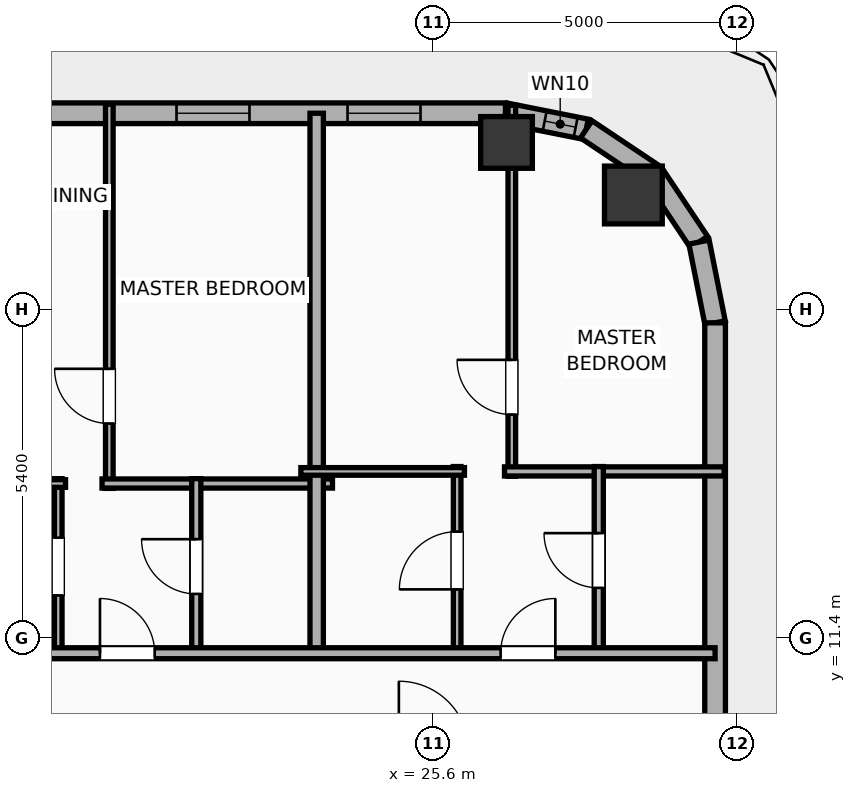
"""IFC4 building model, lengths in metres.
Left out: names, types, materials, properties, quantities, classifications, styles, units other than length and angle.
Written with IfcOpenShell. Run it as: python <this file> out.ifc"""

import sys

from ifc_helpers import new_model, si_unit, direction, frame, frame_2d, origin, origin_2d, place, context, subcontext, project, spatial, rectangle, hollow_rectangle, hollow_circle, extrude, element, fill, save


model = new_model("IFC4")
c1 = context("Model", 3, precision=1e-05, world=origin(), true_north=direction((0.0, 1.0)))
c2 = subcontext(c1, "Body", "Model", "MODEL_VIEW")
j1 = project(units=[si_unit("LENGTHUNIT", "METRE"), si_unit("PLANEANGLEUNIT", "RADIAN")], contexts=[c1])
p1 = place(None, origin())
s1 = spatial("IfcSite", under=j1, at=p1, CompositionType="ELEMENT")
p2 = place(p1, origin())
s2 = spatial("IfcBuilding", under=s1, at=p2, CompositionType="ELEMENT")
p3 = place(p2, frame((0.0, 0.0, 231.4)))
s3 = spatial("IfcBuildingStorey", under=s2, at=p3, CompositionType="ELEMENT", Elevation=231.4)
p4 = place(p3, frame((28.886, 18.686, 0.0), z_axis=(0.0, 0.0, 1.0), x_axis=(1.0, 0.0, 0.0)))
e1 = element("IfcColumn", 1, at=p4, inside=s3, PredefinedType="COLUMN", context=c2, shape_type="SweptSolid", body=[
    extrude(hollow_circle(Radius=0.475, WallThickness=0.032, at=origin_2d()), origin(), (0.0, 0.0, 1.0), 3.9),
])
p5 = place(p3, frame((26.8, 19.55, 0.0), z_axis=(0.0, 0.0, 1.0), x_axis=(1.0, 0.0, 0.0)))
e2 = element("IfcColumn", 2, at=p5, inside=s3, PredefinedType="COLUMN", context=c2, shape_type="SweptSolid", body=[
    extrude(hollow_rectangle(XDim=0.85, YDim=0.85, WallThickness=0.028, at=origin_2d()), origin(), (0.0, 0.0, 1.0), 3.9),
])
p6 = place(p3, frame((-22.783, 20.03, 0.0), z_axis=(0.0, 0.0, 1.0), x_axis=(1.0, 0.0, 0.0)))
e3 = element("IfcWall", 3, at=p6, inside=s3, PredefinedType="ELEMENTEDWALL", context=c2, shape_type="SweptSolid", body=[
    extrude(rectangle(XDim=49.566, YDim=0.34, at=frame_2d((24.783, 0.0))), origin(), (0.0, 0.0, 1.0), 3.65),
])
p7 = place(p6, frame((14.12, 0.0, 0.0)))
e4 = element("IfcOpeningElement", 4, at=p7, cuts=e3, PredefinedType="OPENING", context=c2, shape_type="SweptSolid", body=[
    extrude(rectangle(XDim=1.5, YDim=2.05, at=frame_2d((0.75, 1.025))), frame((0.0, 0.18, 0.0), z_axis=(0.0, -1.0, 0.0), x_axis=(1.0, 0.0, 0.0)), (0.0, 0.0, 1.0), 0.36),
])
p8 = place(p6, frame((6.211, 0.0, 0.75)))
e5 = element("IfcOpeningElement", 5, at=p8, cuts=e3, PredefinedType="OPENING", context=c2, shape_type="SweptSolid", body=[
    extrude(rectangle(XDim=2.4, YDim=2.1, at=frame_2d((1.2, 1.05))), frame((0.0, 0.18, 0.0), z_axis=(0.0, -1.0, 0.0), x_axis=(1.0, 0.0, 0.0)), (0.0, 0.0, 1.0), 0.36),
])
p9 = place(p6, frame((23.583, 0.0, 0.75)))
e6 = element("IfcOpeningElement", 6, at=p9, cuts=e3, PredefinedType="OPENING", context=c2, shape_type="SweptSolid", body=[
    extrude(rectangle(XDim=2.4, YDim=2.1, at=frame_2d((1.2, 1.05))), frame((0.0, 0.18, 0.0), z_axis=(0.0, -1.0, 0.0), x_axis=(1.0, 0.0, 0.0)), (0.0, 0.0, 1.0), 0.36),
])
p10 = place(p6, frame((33.947, 0.0, 0.0)))
e7 = element("IfcOpeningElement", 7, at=p10, cuts=e3, PredefinedType="OPENING", context=c2, shape_type="SweptSolid", body=[
    extrude(rectangle(XDim=1.5, YDim=2.05, at=frame_2d((0.75, 1.025))), frame((0.0, 0.18, 0.0), z_axis=(0.0, -1.0, 0.0), x_axis=(1.0, 0.0, 0.0)), (0.0, 0.0, 1.0), 0.36),
])
p11 = place(p6, frame((2.36, 0.0, 0.75)))
e8 = element("IfcOpeningElement", 8, at=p11, cuts=e3, PredefinedType="OPENING", context=c2, shape_type="SweptSolid", body=[
    extrude(rectangle(XDim=1.2, YDim=2.05, at=frame_2d((0.6, 1.025))), frame((0.0, 0.18, 0.0), z_axis=(0.0, -1.0, 0.0), x_axis=(1.0, 0.0, 0.0)), (0.0, 0.0, 1.0), 0.36),
])
p12 = place(p6, frame((10.598, 0.0, 0.75)))
e9 = element("IfcOpeningElement", 9, at=p12, cuts=e3, PredefinedType="OPENING", context=c2, shape_type="SweptSolid", body=[
    extrude(rectangle(XDim=1.2, YDim=2.05, at=frame_2d((0.6, 1.025))), frame((0.0, 0.18, 0.0), z_axis=(0.0, -1.0, 0.0), x_axis=(1.0, 0.0, 0.0)), (0.0, 0.0, 1.0), 0.36),
])
p13 = place(p6, frame((17.478, 0.0, 0.75)))
e10 = element("IfcOpeningElement", 10, at=p13, cuts=e3, PredefinedType="OPENING", context=c2, shape_type="SweptSolid", body=[
    extrude(rectangle(XDim=1.2, YDim=2.05, at=frame_2d((0.6, 1.025))), frame((0.0, 0.18, 0.0), z_axis=(0.0, -1.0, 0.0), x_axis=(1.0, 0.0, 0.0)), (0.0, 0.0, 1.0), 0.36),
])
p14 = place(p6, frame((20.978, 0.0, 0.75)))
e11 = element("IfcOpeningElement", 11, at=p14, cuts=e3, PredefinedType="OPENING", context=c2, shape_type="SweptSolid", body=[
    extrude(rectangle(XDim=1.2, YDim=2.05, at=frame_2d((0.6, 1.025))), frame((0.0, 0.18, 0.0), z_axis=(0.0, -1.0, 0.0), x_axis=(1.0, 0.0, 0.0)), (0.0, 0.0, 1.0), 0.36),
])
p15 = place(p6, frame((27.758, 0.0, 0.75)))
e12 = element("IfcOpeningElement", 12, at=p15, cuts=e3, PredefinedType="OPENING", context=c2, shape_type="SweptSolid", body=[
    extrude(rectangle(XDim=1.2, YDim=2.05, at=frame_2d((0.6, 1.025))), frame((0.0, 0.18, 0.0), z_axis=(0.0, -1.0, 0.0), x_axis=(1.0, 0.0, 0.0)), (0.0, 0.0, 1.0), 0.36),
])
p16 = place(p6, frame((31.037, 0.0, 0.75)))
e13 = element("IfcOpeningElement", 13, at=p16, cuts=e3, PredefinedType="OPENING", context=c2, shape_type="SweptSolid", body=[
    extrude(rectangle(XDim=1.2, YDim=2.05, at=frame_2d((0.6, 1.025))), frame((0.0, 0.18, 0.0), z_axis=(0.0, -1.0, 0.0), x_axis=(1.0, 0.0, 0.0)), (0.0, 0.0, 1.0), 0.36),
])
p17 = place(p6, frame((37.596, 0.0, 0.75)))
e14 = element("IfcOpeningElement", 14, at=p17, cuts=e3, PredefinedType="OPENING", context=c2, shape_type="SweptSolid", body=[
    extrude(rectangle(XDim=1.2, YDim=2.05, at=frame_2d((0.6, 1.025))), frame((0.0, 0.18, 0.0), z_axis=(0.0, -1.0, 0.0), x_axis=(1.0, 0.0, 0.0)), (0.0, 0.0, 1.0), 0.36),
])
p18 = place(p6, frame((40.876, 0.0, 0.75)))
e15 = element("IfcOpeningElement", 15, at=p18, cuts=e3, PredefinedType="OPENING", context=c2, shape_type="SweptSolid", body=[
    extrude(rectangle(XDim=1.2, YDim=2.05, at=frame_2d((0.6, 1.025))), frame((0.0, 0.18, 0.0), z_axis=(0.0, -1.0, 0.0), x_axis=(1.0, 0.0, 0.0)), (0.0, 0.0, 1.0), 0.36),
])
p19 = place(p6, frame((44.156, 0.0, 0.75)))
e16 = element("IfcOpeningElement", 16, at=p19, cuts=e3, PredefinedType="OPENING", context=c2, shape_type="SweptSolid", body=[
    extrude(rectangle(XDim=1.2, YDim=2.05, at=frame_2d((0.6, 1.025))), frame((0.0, 0.18, 0.0), z_axis=(0.0, -1.0, 0.0), x_axis=(1.0, 0.0, 0.0)), (0.0, 0.0, 1.0), 0.36),
])
p20 = place(p6, frame((46.969, 0.0, 0.75)))
e17 = element("IfcOpeningElement", 17, at=p20, cuts=e3, PredefinedType="OPENING", context=c2, shape_type="SweptSolid", body=[
    extrude(rectangle(XDim=1.2, YDim=2.05, at=frame_2d((0.6, 1.025))), frame((0.0, 0.18, 0.0), z_axis=(0.0, -1.0, 0.0), x_axis=(1.0, 0.0, 0.0)), (0.0, 0.0, 1.0), 0.36),
])
p21 = place(p3, frame((26.783, 20.03, 0.0), z_axis=(0.0, 0.0, 1.0), x_axis=(0.980788153188, -0.195075878998, 0.0)))
e18 = element("IfcWall", 18, at=p21, inside=s3, PredefinedType="ELEMENTEDWALL", context=c2, shape_type="SweptSolid", body=[
    extrude(rectangle(XDim=1.354, YDim=0.34, at=frame_2d((0.677, 0.0))), origin(), (0.0, 0.0, 1.0), 3.65),
])
p22 = place(p21, frame((0.657, 0.0, 0.75)))
e19 = element("IfcOpeningElement", 19, at=p22, cuts=e18, PredefinedType="OPENING", context=c2, shape_type="SweptSolid", body=[
    extrude(rectangle(XDim=0.52, YDim=2.05, at=frame_2d((0.26, 1.025))), frame((0.0, 0.18, 0.0), z_axis=(0.0, -1.0, 0.0), x_axis=(1.0, 0.0, 0.0)), (0.0, 0.0, 1.0), 0.36),
])
for number, where, z_axis, x_axis in (
    (20, (28.111, 19.766, 0.0), (0.0, 0.0, 1.0), (0.831, -0.556, 0.0)),
    (21, (29.223, 19.023, 0.0), (0.0, 0.0, 1.0), (0.556, -0.831, 0.0)),
):
    element("IfcWall", number, at=place(p3, frame(where, z_axis=z_axis, x_axis=x_axis)), inside=s3, PredefinedType="ELEMENTEDWALL", context=c2, shape_type="SweptSolid", body=[
        extrude(rectangle(XDim=1.337, YDim=0.34, at=frame_2d((0.668, 0.0))), origin(), (0.0, 0.0, 1.0), 3.65),
    ])
p23 = place(p3, frame((29.966, 17.911, 0.0), z_axis=(0.0, 0.0, 1.0), x_axis=(0.195075878998, -0.980788153188, 0.0)))
e22 = element("IfcWall", 22, at=p23, inside=s3, PredefinedType="ELEMENTEDWALL", context=c2, shape_type="SweptSolid", body=[
    extrude(rectangle(XDim=1.354, YDim=0.34, at=frame_2d((0.677, 0.0))), origin(), (0.0, 0.0, 1.0), 3.65),
])
p24 = place(p3, frame((30.23, 16.583, 0.0), z_axis=(0.0, 0.0, 1.0), x_axis=(0.0, -1.0, 0.0)))
e23 = element("IfcWall", 23, at=p24, inside=s3, PredefinedType="ELEMENTEDWALL", context=c2, shape_type="SweptSolid", body=[
    extrude(rectangle(XDim=31.967, YDim=0.34, at=frame_2d((15.983, 0.0))), origin(), (0.0, 0.0, 1.0), 3.65),
])
p25 = place(p24, frame((23.925, 0.0, 0.75)))
e24 = element("IfcOpeningElement", 24, at=p25, cuts=e23, PredefinedType="OPENING", context=c2, shape_type="SweptSolid", body=[
    extrude(rectangle(XDim=1.8, YDim=2.1, at=frame_2d((0.9, 1.05))), frame((0.0, 0.18, 0.0), z_axis=(0.0, -1.0, 0.0), x_axis=(1.0, 0.0, 0.0)), (0.0, 0.0, 1.0), 0.36),
])
p26 = place(p24, frame((30.402, 0.0, 0.75)))
e25 = element("IfcOpeningElement", 25, at=p26, cuts=e23, PredefinedType="OPENING", context=c2, shape_type="SweptSolid", body=[
    extrude(rectangle(XDim=1.2, YDim=2.05, at=frame_2d((0.6, 1.025))), frame((0.0, 0.18, 0.0), z_axis=(0.0, -1.0, 0.0), x_axis=(1.0, 0.0, 0.0)), (0.0, 0.0, 1.0), 0.36),
])
p27 = place(p24, frame((11.113, 0.0, 0.75)))
e26 = element("IfcOpeningElement", 26, at=p27, cuts=e23, PredefinedType="OPENING", context=c2, shape_type="SweptSolid", body=[
    extrude(rectangle(XDim=1.2, YDim=2.05, at=frame_2d((0.6, 1.025))), frame((0.0, 0.18, 0.0), z_axis=(0.0, -1.0, 0.0), x_axis=(1.0, 0.0, 0.0)), (0.0, 0.0, 1.0), 0.36),
])
p28 = place(p3, frame((20.268, 13.861, 0.0), z_axis=(0.0, 0.0, 1.0), x_axis=(0.0, 1.0, 0.0)))
e27 = element("IfcWall", 27, at=p28, inside=s3, PredefinedType="PARTITIONING", context=c2, shape_type="SweptSolid", body=[
    extrude(rectangle(XDim=6.319, YDim=0.125, at=frame_2d((3.159, 0.0))), origin(), (0.0, 0.0, 1.0), 3.65),
])
p29 = place(p28, frame((1.067, 0.0, 0.0)))
e28 = element("IfcOpeningElement", 28, at=p29, cuts=e27, PredefinedType="OPENING", context=c2, shape_type="SweptSolid", body=[
    extrude(rectangle(XDim=0.9, YDim=2.05, at=frame_2d((0.45, 1.025))), frame((0.0, 0.073, 0.0), z_axis=(0.0, -1.0, 0.0), x_axis=(1.0, 0.0, 0.0)), (0.0, 0.0, 1.0), 0.145),
])
p30 = place(p3, frame((20.148, 13.941, 0.0), z_axis=(0.0, 0.0, 1.0), x_axis=(1.0, 0.0, 0.0)))
e29 = element("IfcWall", 29, at=p30, inside=s3, PredefinedType="PLUMBINGWALL", context=c2, shape_type="SweptSolid", body=[
    extrude(rectangle(XDim=3.79, YDim=0.15, at=frame_2d((1.895, 0.0))), origin(), (0.0, 0.0, 1.0), 3.65),
])
p31 = place(p3, frame((19.428, 11.13, 0.0), z_axis=(0.0, 0.0, 1.0), x_axis=(0.0, 1.0, 0.0)))
e30 = element("IfcWall", 30, at=p31, inside=s3, PredefinedType="PARTITIONING", context=c2, shape_type="SweptSolid", body=[
    extrude(rectangle(XDim=2.891, YDim=0.125, at=frame_2d((1.446, 0.0))), origin(), (0.0, 0.0, 1.0), 3.65),
])
p32 = place(p31, frame((0.97, 0.0, 0.0)))
e31 = element("IfcOpeningElement", 31, at=p32, cuts=e30, PredefinedType="OPENING", context=c2, shape_type="SweptSolid", body=[
    extrude(rectangle(XDim=0.95, YDim=2.05, at=frame_2d((0.475, 1.025))), frame((0.0, 0.073, 0.0), z_axis=(0.0, -1.0, 0.0), x_axis=(1.0, 0.0, 0.0)), (0.0, 0.0, 1.0), 0.145),
])
p33 = place(p3, frame((16.858, 13.941, 0.0), z_axis=(0.0, 0.0, 1.0), x_axis=(1.0, 0.0, 0.0)))
e32 = element("IfcWall", 32, at=p33, inside=s3, PredefinedType="PARTITIONING", context=c2, shape_type="SweptSolid", body=[
    extrude(rectangle(XDim=2.69, YDim=0.125, at=frame_2d((1.345, 0.0))), origin(), (0.0, 0.0, 1.0), 3.65),
])
p34 = place(p3, frame((21.698, 11.13, 0.0), z_axis=(0.0, 0.0, 1.0), x_axis=(0.0, 1.0, 0.0)))
e33 = element("IfcWall", 33, at=p34, inside=s3, PredefinedType="PLUMBINGWALL", context=c2, shape_type="SweptSolid", body=[
    extrude(rectangle(XDim=2.891, YDim=0.15, at=frame_2d((1.446, 0.0))), origin(), (0.0, 0.0, 1.0), 3.65),
])
p35 = place(p34, frame((0.996, 0.0, 0.0)))
e34 = element("IfcOpeningElement", 34, at=p35, cuts=e33, PredefinedType="OPENING", context=c2, shape_type="SweptSolid", body=[
    extrude(rectangle(XDim=0.9, YDim=2.05, at=frame_2d((0.45, 1.025))), frame((0.0, 0.085, 0.0), z_axis=(0.0, -1.0, 0.0), x_axis=(1.0, 0.0, 0.0)), (0.0, 0.0, 1.0), 0.17),
])
p36 = place(p3, frame((23.678, 11.07, 0.0), z_axis=(0.0, 0.0, 1.0), x_axis=(0.0, 1.0, 0.0)))
e35 = element("IfcWall", 35, at=p36, inside=s3, PredefinedType="PARTITIONING", context=c2, shape_type="SweptSolid", body=[
    extrude(rectangle(XDim=8.96, YDim=0.22, at=frame_2d((4.48, 0.0))), origin(), (0.0, 0.0, 1.0), 3.65),
])
p37 = place(p3, frame((26.887, 14.06, 0.0), z_axis=(0.0, 0.0, 1.0), x_axis=(0.0, 1.0, 0.0)))
e36 = element("IfcWall", 36, at=p37, inside=s3, PredefinedType="PARTITIONING", context=c2, shape_type="SweptSolid", body=[
    extrude(rectangle(XDim=6.102, YDim=0.125, at=frame_2d((3.051, 0.0))), origin(), (0.0, 0.0, 1.0), 3.65),
])
p38 = place(p37, frame((1.015, 0.0, 0.0)))
e37 = element("IfcOpeningElement", 37, at=p38, cuts=e36, PredefinedType="OPENING", context=c2, shape_type="SweptSolid", body=[
    extrude(rectangle(XDim=0.9, YDim=2.05, at=frame_2d((0.45, 1.025))), frame((0.0, 0.073, 0.0), z_axis=(0.0, -1.0, 0.0), x_axis=(1.0, 0.0, 0.0)), (0.0, 0.0, 1.0), 0.145),
])
p39 = place(p3, frame((26.767, 14.14, 0.0), z_axis=(0.0, 0.0, 1.0), x_axis=(1.0, 0.0, 0.0)))
e38 = element("IfcWall", 38, at=p39, inside=s3, PredefinedType="PLUMBINGWALL", context=c2, shape_type="SweptSolid", body=[
    extrude(rectangle(XDim=3.613, YDim=0.15, at=frame_2d((1.806, 0.0))), origin(), (0.0, 0.0, 1.0), 3.65),
])
p40 = place(p3, frame((25.988, 11.13, 0.0), z_axis=(0.0, 0.0, 1.0), x_axis=(0.0, 1.0, 0.0)))
e39 = element("IfcWall", 39, at=p40, inside=s3, PredefinedType="PARTITIONING", context=c2, shape_type="SweptSolid", body=[
    extrude(rectangle(XDim=3.09, YDim=0.125, at=frame_2d((1.545, 0.0))), origin(), (0.0, 0.0, 1.0), 3.65),
])
p41 = place(p40, frame((1.07, 0.0, 0.0)))
e40 = element("IfcOpeningElement", 40, at=p41, cuts=e39, PredefinedType="OPENING", context=c2, shape_type="SweptSolid", body=[
    extrude(rectangle(XDim=0.95, YDim=2.05, at=frame_2d((0.475, 1.025))), frame((0.0, 0.073, 0.0), z_axis=(0.0, -1.0, 0.0), x_axis=(1.0, 0.0, 0.0)), (0.0, 0.0, 1.0), 0.145),
])
p42 = place(p3, frame((23.418, 14.14, 0.0), z_axis=(0.0, 0.0, 1.0), x_axis=(1.0, 0.0, 0.0)))
e41 = element("IfcWall", 41, at=p42, inside=s3, PredefinedType="PARTITIONING", context=c2, shape_type="SweptSolid", body=[
    extrude(rectangle(XDim=2.69, YDim=0.125, at=frame_2d((1.345, 0.0))), origin(), (0.0, 0.0, 1.0), 3.65),
])
p43 = place(p3, frame((28.317, 11.13, 0.0), z_axis=(0.0, 0.0, 1.0), x_axis=(0.0, 1.0, 0.0)))
e42 = element("IfcWall", 42, at=p43, inside=s3, PredefinedType="PLUMBINGWALL", context=c2, shape_type="SweptSolid", body=[
    extrude(rectangle(XDim=3.09, YDim=0.15, at=frame_2d((1.545, 0.0))), origin(), (0.0, 0.0, 1.0), 3.65),
])
p44 = place(p43, frame((1.095, 0.0, 0.0)))
e43 = element("IfcOpeningElement", 43, at=p44, cuts=e42, PredefinedType="OPENING", context=c2, shape_type="SweptSolid", body=[
    extrude(rectangle(XDim=0.9, YDim=2.05, at=frame_2d((0.45, 1.025))), frame((0.0, 0.085, 0.0), z_axis=(0.0, -1.0, 0.0), x_axis=(1.0, 0.0, 0.0)), (0.0, 0.0, 1.0), 0.17),
])
p45 = place(p3, frame((-26.23, 11.15, 0.0), z_axis=(0.0, 0.0, 1.0), x_axis=(1.0, 0.0, 0.0)))
e44 = element("IfcWall", 44, at=p45, inside=s3, PredefinedType="PARTITIONING", context=c2, shape_type="SweptSolid", body=[
    extrude(rectangle(XDim=56.46, YDim=0.18, at=frame_2d((28.23, 0.0))), origin(), (0.0, 0.0, 1.0), 3.65),
])
p46 = place(p45, frame((3.614, 0.0, 0.0)))
e45 = element("IfcOpeningElement", 45, at=p46, cuts=e44, PredefinedType="OPENING", context=c2, shape_type="SweptSolid", body=[
    extrude(rectangle(XDim=1.15, YDim=2.05, at=frame_2d((0.575, 1.025))), frame((0.0, 0.1, 0.0), z_axis=(0.0, -1.0, 0.0), x_axis=(1.0, 0.0, 0.0)), (0.0, 0.0, 1.0), 0.2),
])
p47 = place(p45, frame((11.761, 0.0, 0.0)))
e46 = element("IfcOpeningElement", 46, at=p47, cuts=e44, PredefinedType="OPENING", context=c2, shape_type="SweptSolid", body=[
    extrude(rectangle(XDim=1.15, YDim=2.05, at=frame_2d((0.575, 1.025))), frame((0.0, 0.1, 0.0), z_axis=(0.0, -1.0, 0.0), x_axis=(1.0, 0.0, 0.0)), (0.0, 0.0, 1.0), 0.2),
])
p48 = place(p45, frame((19.447, 0.0, 0.0)))
e47 = element("IfcOpeningElement", 47, at=p48, cuts=e44, PredefinedType="OPENING", context=c2, shape_type="SweptSolid", body=[
    extrude(rectangle(XDim=0.9, YDim=2.05, at=frame_2d((0.45, 1.025))), frame((0.0, 0.1, 0.0), z_axis=(0.0, -1.0, 0.0), x_axis=(1.0, 0.0, 0.0)), (0.0, 0.0, 1.0), 0.2),
])
p49 = place(p45, frame((26.448, 0.0, 0.0)))
e48 = element("IfcOpeningElement", 48, at=p49, cuts=e44, PredefinedType="OPENING", context=c2, shape_type="SweptSolid", body=[
    extrude(rectangle(XDim=0.9, YDim=2.05, at=frame_2d((0.45, 1.025))), frame((0.0, 0.1, 0.0), z_axis=(0.0, -1.0, 0.0), x_axis=(1.0, 0.0, 0.0)), (0.0, 0.0, 1.0), 0.2),
])
p50 = place(p45, frame((33.223, 0.0, 0.0)))
e49 = element("IfcOpeningElement", 49, at=p50, cuts=e44, PredefinedType="OPENING", context=c2, shape_type="SweptSolid", body=[
    extrude(rectangle(XDim=0.9, YDim=2.05, at=frame_2d((0.45, 1.025))), frame((0.0, 0.1, 0.0), z_axis=(0.0, -1.0, 0.0), x_axis=(1.0, 0.0, 0.0)), (0.0, 0.0, 1.0), 0.2),
])
p51 = place(p45, frame((39.783, 0.0, 0.0)))
e50 = element("IfcOpeningElement", 50, at=p51, cuts=e44, PredefinedType="OPENING", context=c2, shape_type="SweptSolid", body=[
    extrude(rectangle(XDim=0.9, YDim=2.05, at=frame_2d((0.45, 1.025))), frame((0.0, 0.1, 0.0), z_axis=(0.0, -1.0, 0.0), x_axis=(1.0, 0.0, 0.0)), (0.0, 0.0, 1.0), 0.2),
])
p52 = place(p45, frame((46.344, 0.0, 0.0)))
e51 = element("IfcOpeningElement", 51, at=p52, cuts=e44, PredefinedType="OPENING", context=c2, shape_type="SweptSolid", body=[
    extrude(rectangle(XDim=0.9, YDim=2.05, at=frame_2d((0.45, 1.025))), frame((0.0, 0.1, 0.0), z_axis=(0.0, -1.0, 0.0), x_axis=(1.0, 0.0, 0.0)), (0.0, 0.0, 1.0), 0.2),
])
p53 = place(p45, frame((52.933, 0.0, 0.0)))
e52 = element("IfcOpeningElement", 52, at=p53, cuts=e44, PredefinedType="OPENING", context=c2, shape_type="SweptSolid", body=[
    extrude(rectangle(XDim=0.9, YDim=2.05, at=frame_2d((0.45, 1.025))), frame((0.0, 0.1, 0.0), z_axis=(0.0, -1.0, 0.0), x_axis=(1.0, 0.0, 0.0)), (0.0, 0.0, 1.0), 0.2),
])
p54 = place(p19, origin())
e53 = element("IfcWindow", 53, at=p54, inside=s3, PartitioningType="SINGLE_PANEL", PredefinedType="WINDOW", context=c2, shape_type="SweptSolid", body=[
    extrude(rectangle(XDim=1.2, YDim=2.05, at=frame_2d((0.6, 1.025))), frame((0.0, 0.03, 0.0), z_axis=(0.0, -1.0, 0.0), x_axis=(1.0, 0.0, 0.0)), (0.0, 0.0, 1.0), 0.06),
])
fill(e16, e53)
p55 = place(p20, origin())
e54 = element("IfcWindow", 54, at=p55, inside=s3, PartitioningType="SINGLE_PANEL", PredefinedType="WINDOW", context=c2, shape_type="SweptSolid", body=[
    extrude(rectangle(XDim=1.2, YDim=2.05, at=frame_2d((0.6, 1.025))), frame((0.0, 0.03, 0.0), z_axis=(0.0, -1.0, 0.0), x_axis=(1.0, 0.0, 0.0)), (0.0, 0.0, 1.0), 0.06),
])
fill(e17, e54)
p56 = place(p22, origin())
e55 = element("IfcWindow", 55, at=p56, inside=s3, PartitioningType="SINGLE_PANEL", PredefinedType="WINDOW", context=c2, shape_type="SweptSolid", body=[
    extrude(rectangle(XDim=0.52, YDim=2.05, at=frame_2d((0.26, 1.025))), frame((0.0, 0.03, 0.0), z_axis=(0.0, -1.0, 0.0), x_axis=(1.0, 0.0, 0.0)), (0.0, 0.0, 1.0), 0.06),
])
fill(e19, e55)
p57 = place(p29, origin())
e56 = element("IfcDoor", 56, at=p57, inside=s3, OperationType="SINGLE_SWING_RIGHT", PredefinedType="DOOR", context=c2, shape_type="SweptSolid", body=[
    extrude(rectangle(XDim=0.9, YDim=2.05, at=frame_2d((0.45, 1.025))), frame((0.0, 0.025, 0.0), z_axis=(0.0, -1.0, 0.0), x_axis=(1.0, 0.0, 0.0)), (0.0, 0.0, 1.0), 0.05),
])
fill(e28, e56)
p58 = place(p32, origin())
e57 = element("IfcDoor", 57, at=p58, inside=s3, OperationType="SINGLE_SWING_LEFT", PredefinedType="DOOR", context=c2, shape_type="SweptSolid", body=[
    extrude(rectangle(XDim=0.95, YDim=2.05, at=frame_2d((0.475, 1.025))), frame((0.0, 0.025, 0.0), z_axis=(0.0, -1.0, 0.0), x_axis=(1.0, 0.0, 0.0)), (0.0, 0.0, 1.0), 0.05),
])
fill(e31, e57)
p59 = place(p35, origin())
e58 = element("IfcDoor", 58, at=p59, inside=s3, OperationType="SINGLE_SWING_RIGHT", PredefinedType="DOOR", context=c2, shape_type="SweptSolid", body=[
    extrude(rectangle(XDim=0.9, YDim=2.05, at=frame_2d((0.45, 1.025))), frame((0.0, 0.025, 0.0), z_axis=(0.0, -1.0, 0.0), x_axis=(1.0, 0.0, 0.0)), (0.0, 0.0, 1.0), 0.05),
])
fill(e34, e58)
p60 = place(p38, origin())
e59 = element("IfcDoor", 59, at=p60, inside=s3, OperationType="SINGLE_SWING_RIGHT", PredefinedType="DOOR", context=c2, shape_type="SweptSolid", body=[
    extrude(rectangle(XDim=0.9, YDim=2.05, at=frame_2d((0.45, 1.025))), frame((0.0, 0.025, 0.0), z_axis=(0.0, -1.0, 0.0), x_axis=(1.0, 0.0, 0.0)), (0.0, 0.0, 1.0), 0.05),
])
fill(e37, e59)
p61 = place(p41, origin())
e60 = element("IfcDoor", 60, at=p61, inside=s3, OperationType="SINGLE_SWING_LEFT", PredefinedType="DOOR", context=c2, shape_type="SweptSolid", body=[
    extrude(rectangle(XDim=0.95, YDim=2.05, at=frame_2d((0.475, 1.025))), frame((0.0, 0.025, 0.0), z_axis=(0.0, -1.0, 0.0), x_axis=(1.0, 0.0, 0.0)), (0.0, 0.0, 1.0), 0.05),
])
fill(e40, e60)
p62 = place(p44, origin())
e61 = element("IfcDoor", 61, at=p62, inside=s3, OperationType="SINGLE_SWING_RIGHT", PredefinedType="DOOR", context=c2, shape_type="SweptSolid", body=[
    extrude(rectangle(XDim=0.9, YDim=2.05, at=frame_2d((0.45, 1.025))), frame((0.0, 0.025, 0.0), z_axis=(0.0, -1.0, 0.0), x_axis=(1.0, 0.0, 0.0)), (0.0, 0.0, 1.0), 0.05),
])
fill(e43, e61)
p63 = place(p52, origin())
e62 = element("IfcDoor", 62, at=p63, inside=s3, OperationType="SINGLE_SWING_LEFT", PredefinedType="DOOR", context=c2, shape_type="SweptSolid", body=[
    extrude(rectangle(XDim=0.9, YDim=2.05, at=frame_2d((0.45, 1.025))), frame((0.0, 0.025, 0.0), z_axis=(0.0, -1.0, 0.0), x_axis=(1.0, 0.0, 0.0)), (0.0, 0.0, 1.0), 0.05),
])
fill(e51, e62)
p64 = place(p53, origin())
e63 = element("IfcDoor", 63, at=p64, inside=s3, OperationType="SINGLE_SWING_RIGHT", PredefinedType="DOOR", context=c2, shape_type="SweptSolid", body=[
    extrude(rectangle(XDim=0.9, YDim=2.05, at=frame_2d((0.45, 1.025))), frame((0.0, 0.025, 0.0), z_axis=(0.0, -1.0, 0.0), x_axis=(1.0, 0.0, 0.0)), (0.0, 0.0, 1.0), 0.05),
])
fill(e52, e63)
save(model, sys.argv[1])
